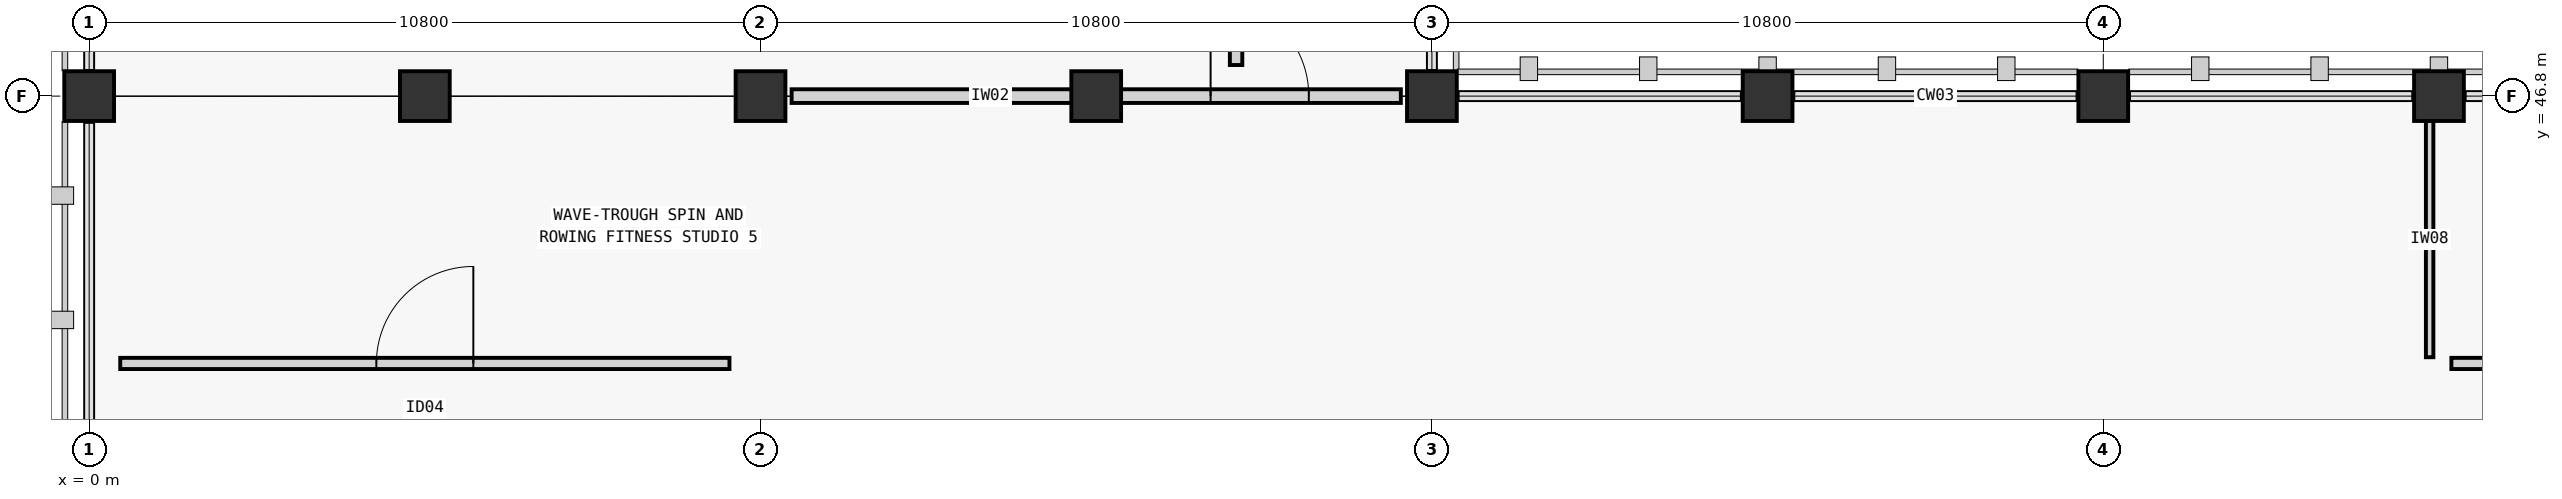
"""IFC4 building model, lengths in metres.
Left out: names, types, materials, properties, quantities, classifications, styles, units other than length and angle.
Written with IfcOpenShell. Run it as: python <this file> out.ifc"""

import sys

from ifc_helpers import new_model, si_unit, direction, frame, frame_2d, origin, origin_2d, place, context, subcontext, project, spatial, rectangle, extrude, element, fill, save


model = new_model("IFC4")
c1 = context("Model", 3, precision=1e-05, world=origin(), true_north=direction((0.0, 1.0)))
c2 = subcontext(c1, "Body", "Model", "MODEL_VIEW")
j1 = project(units=[si_unit("LENGTHUNIT", "METRE"), si_unit("PLANEANGLEUNIT", "RADIAN")], contexts=[c1])
p1 = place(None, origin())
s1 = spatial("IfcSite", under=j1, at=p1, CompositionType="ELEMENT")
p2 = place(p1, origin())
s2 = spatial("IfcBuilding", under=s1, at=p2, CompositionType="ELEMENT")
p3 = place(p2, frame((0.0, 0.0, 5.4)))
s3 = spatial("IfcBuildingStorey", under=s2, at=p3, CompositionType="ELEMENT", Elevation=5.4)
for number, where, z_axis, x_axis in (
    (1, (0.0, 46.8, 0.0), (0.0, 0.0, 1.0), (1.0, 0.0, 0.0)),
    (2, (10.8, 46.8, 0.0), (0.0, 0.0, 1.0), (1.0, 0.0, 0.0)),
    (3, (21.6, 46.8, 0.0), (0.0, 0.0, 1.0), (1.0, 0.0, 0.0)),
    (4, (32.4, 46.8, 0.0), (0.0, 0.0, 1.0), (1.0, 0.0, 0.0)),
    (5, (5.4, 46.8, 0.0), (0.0, 0.0, 1.0), (1.0, 0.0, 0.0)),
    (6, (16.2, 46.8, 0.0), (0.0, 0.0, 1.0), (1.0, 0.0, 0.0)),
    (7, (27.0, 46.8, 0.0), (0.0, 0.0, 1.0), (1.0, 0.0, 0.0)),
    (8, (37.8, 46.8, 0.0), (0.0, 0.0, 1.0), (1.0, 0.0, 0.0)),
):
    element("IfcColumn", number, at=place(p3, frame(where, z_axis=z_axis, x_axis=x_axis)), inside=s3, PredefinedType="COLUMN", context=c2, shape_type="SweptSolid", body=[
        extrude(rectangle(XDim=0.8, YDim=0.8, at=origin_2d()), origin(), (0.0, 0.0, 1.0), 5.4),
    ])
p4 = place(p3, frame((11.3, 46.8, 0.0), z_axis=(0.0, 0.0, 1.0), x_axis=(1.0, 0.0, 0.0)))
e9 = element("IfcWall", 9, at=p4, inside=s3, PredefinedType="STANDARD", context=c2, shape_type="SweptSolid", body=[
    extrude(rectangle(XDim=9.8, YDim=0.22, at=frame_2d((4.9, 0.0))), origin(), (0.0, 0.0, 1.0), 4.22),
])
p5 = place(p4, frame((6.74, 0.0, 0.0)))
e10 = element("IfcOpeningElement", 10, at=p5, cuts=e9, PredefinedType="OPENING", context=c2, shape_type="SweptSolid", body=[
    extrude(rectangle(XDim=1.58, YDim=2.24, at=frame_2d((0.79, 1.12))), frame((0.0, 0.11, 0.0), z_axis=(0.0, -1.0, 0.0), x_axis=(1.0, 0.0, 0.0)), (0.0, 0.0, 1.0), 0.22),
])
p6 = place(p3, frame((0.5, 42.5, 0.0), z_axis=(0.0, 0.0, 1.0), x_axis=(1.0, 0.0, 0.0)))
e11 = element("IfcWall", 11, at=p6, inside=s3, PredefinedType="STANDARD", context=c2, shape_type="SweptSolid", body=[
    extrude(rectangle(XDim=9.8, YDim=0.18, at=frame_2d((4.9, 0.0))), origin(), (0.0, 0.0, 1.0), 4.22),
])
p7 = place(p6, frame((4.12, 0.0, 0.0)))
e12 = element("IfcOpeningElement", 12, at=p7, cuts=e11, PredefinedType="OPENING", context=c2, shape_type="SweptSolid", body=[
    extrude(rectangle(XDim=1.56, YDim=2.25, at=frame_2d((0.78, 1.125))), frame((0.0, 0.09, 0.0), z_axis=(0.0, -1.0, 0.0), x_axis=(1.0, 0.0, 0.0)), (0.0, 0.0, 1.0), 0.18),
])
p8 = place(p3, frame((38.0, 42.5, 0.0), z_axis=(0.0, 0.0, 1.0), x_axis=(1.0, 0.0, 0.0)))
e13 = element("IfcWall", 13, at=p8, inside=s3, PredefinedType="STANDARD", context=c2, shape_type="SweptSolid", body=[
    extrude(rectangle(XDim=4.7, YDim=0.18, at=frame_2d((2.35, 0.0))), origin(), (0.0, 0.0, 1.0), 4.22),
])
p9 = place(p8, frame((1.62, 0.0, 0.0)))
e14 = element("IfcOpeningElement", 14, at=p9, cuts=e13, PredefinedType="OPENING", context=c2, shape_type="SweptSolid", body=[
    extrude(rectangle(XDim=1.46, YDim=2.24, at=frame_2d((0.73, 1.12))), frame((0.0, 0.09, 0.0), z_axis=(0.0, -1.0, 0.0), x_axis=(1.0, 0.0, 0.0)), (0.0, 0.0, 1.0), 0.18),
])
p10 = place(p3, frame((37.65, 42.6, 0.0), z_axis=(0.0, 0.0, 1.0), x_axis=(0.0, 1.0, 0.0)))
e15 = element("IfcWall", 15, at=p10, inside=s3, PredefinedType="STANDARD", context=c2, shape_type="SweptSolid", body=[
    extrude(rectangle(XDim=3.8, YDim=0.12, at=frame_2d((1.9, 0.0))), origin(), (0.0, 0.0, 1.0), 4.22),
])
p11 = place(p3, frame((18.45, 47.3, 0.0), z_axis=(0.0, 0.0, 1.0), x_axis=(0.0, 1.0, 0.0)))
e16 = element("IfcWall", 16, at=p11, inside=s3, PredefinedType="STANDARD", context=c2, shape_type="SweptSolid", body=[
    extrude(rectangle(XDim=20.7, YDim=0.2, at=frame_2d((10.35, 0.0))), origin(), (0.0, 0.0, 1.0), 4.22),
])
p12 = place(p11, frame((9.52, 0.0, 0.0)))
e17 = element("IfcOpeningElement", 17, at=p12, cuts=e16, PredefinedType="OPENING", context=c2, shape_type="SweptSolid", body=[
    extrude(rectangle(XDim=1.66, YDim=2.32, at=frame_2d((0.83, 1.16))), frame((0.0, 0.1, 0.0), z_axis=(0.0, -1.0, 0.0), x_axis=(1.0, 0.0, 0.0)), (0.0, 0.0, 1.0), 0.2),
])
p13 = place(p5, origin())
e18 = element("IfcDoor", 18, at=p13, inside=s3, OperationType="SINGLE_SWING_LEFT", PredefinedType="DOOR", context=c2, shape_type="SweptSolid", body=[
    extrude(rectangle(XDim=1.58, YDim=2.24, at=frame_2d((0.79, 1.12))), frame((0.0, 0.025, 0.0), z_axis=(0.0, -1.0, 0.0), x_axis=(1.0, 0.0, 0.0)), (0.0, 0.0, 1.0), 0.05),
])
fill(e10, e18)
p14 = place(p7, origin())
e19 = element("IfcDoor", 19, at=p14, inside=s3, OperationType="SINGLE_SWING_RIGHT", PredefinedType="DOOR", context=c2, shape_type="SweptSolid", body=[
    extrude(rectangle(XDim=1.56, YDim=2.25, at=frame_2d((0.78, 1.125))), frame((0.0, 0.025, 0.0), z_axis=(0.0, -1.0, 0.0), x_axis=(1.0, 0.0, 0.0)), (0.0, 0.0, 1.0), 0.05),
])
fill(e12, e19)
save(model, sys.argv[1])
